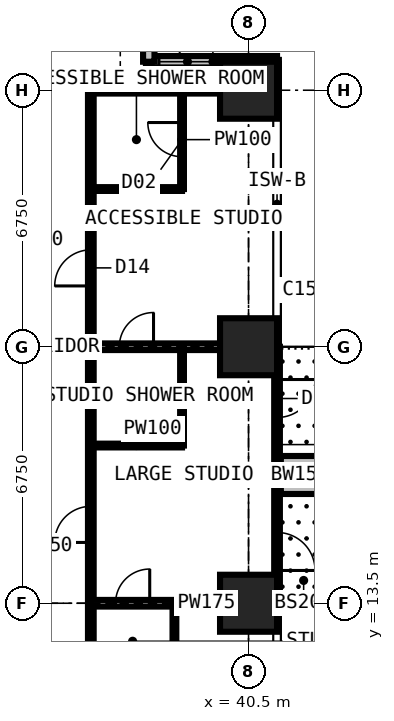
"""IFC4 building model, lengths in metres.
Left out: names, types, materials, properties, quantities, classifications, styles, units other than length and angle.
Written with IfcOpenShell. Run it as: python <this file> out.ifc"""

import sys

from ifc_helpers import new_model, si_unit, direction, frame, frame_2d, origin, origin_2d, place, context, subcontext, project, spatial, rectangle, extrude, element, fill, save


model = new_model("IFC4")
c1 = context("Model", 3, precision=1e-05, world=origin(), true_north=direction((0.0, 1.0)))
c2 = subcontext(c1, "Body", "Model", "MODEL_VIEW")
j1 = project(units=[si_unit("LENGTHUNIT", "METRE"), si_unit("PLANEANGLEUNIT", "RADIAN")], contexts=[c1])
p1 = place(None, origin())
s1 = spatial("IfcSite", under=j1, at=p1, CompositionType="ELEMENT")
p2 = place(p1, origin())
s2 = spatial("IfcBuilding", under=s1, at=p2, CompositionType="ELEMENT")
p3 = place(p2, frame((0.0, 0.0, 123.3)))
s3 = spatial("IfcBuildingStorey", under=s2, at=p3, CompositionType="ELEMENT", Elevation=123.3)
for number, where, z_axis, x_axis in (
    (1, (40.5, 13.5, 0.0), (0.0, 0.0, 1.0), (1.0, 0.0, 0.0)),
    (2, (40.5, 20.25, 0.0), (0.0, 0.0, 1.0), (1.0, 0.0, 0.0)),
    (3, (40.5, 27.0, 0.0), (0.0, 0.0, 1.0), (1.0, 0.0, 0.0)),
):
    element("IfcColumn", number, at=place(p3, frame(where, z_axis=z_axis, x_axis=x_axis)), inside=s3, PredefinedType="COLUMN", context=c2, shape_type="SweptSolid", body=[
        extrude(rectangle(XDim=1.5, YDim=1.5, at=origin_2d()), origin(), (0.0, 0.0, 1.0), 3.6),
    ])
p4 = place(p3, frame((41.25, 20.25, 0.0), z_axis=(0.0, 0.0, 1.0), x_axis=(0.0, -1.0, 0.0)))
e4 = element("IfcWall", 4, at=p4, inside=s3, PredefinedType="SOLIDWALL", context=c2, shape_type="SweptSolid", body=[
    extrude(rectangle(XDim=6.75, YDim=0.15, at=frame_2d((3.375, 0.0))), origin(), (0.0, 0.0, 1.0), 3.375),
])
p5 = place(p4, frame((0.863, 0.0, 0.0)))
e5 = element("IfcOpeningElement", 5, at=p5, cuts=e4, PredefinedType="OPENING", context=c2, shape_type="SweptSolid", body=[
    extrude(rectangle(XDim=1.0, YDim=2.2, at=frame_2d((0.5, 1.1))), frame((0.0, 0.085, 0.0), z_axis=(0.0, -1.0, 0.0), x_axis=(1.0, 0.0, 0.0)), (0.0, 0.0, 1.0), 0.17),
])
p6 = place(p4, frame((1.975, 0.0, 0.9)))
e6 = element("IfcOpeningElement", 6, at=p6, cuts=e4, PredefinedType="OPENING", context=c2, shape_type="SweptSolid", body=[
    extrude(rectangle(XDim=1.2, YDim=1.8, at=frame_2d((0.6, 0.9))), frame((0.0, 0.085, 0.0), z_axis=(0.0, -1.0, 0.0), x_axis=(1.0, 0.0, 0.0)), (0.0, 0.0, 1.0), 0.17),
])
p7 = place(p4, frame((4.887, 0.0, 0.0)))
e7 = element("IfcOpeningElement", 7, at=p7, cuts=e4, PredefinedType="OPENING", context=c2, shape_type="SweptSolid", body=[
    extrude(rectangle(XDim=1.0, YDim=2.2, at=frame_2d((0.5, 1.1))), frame((0.0, 0.085, 0.0), z_axis=(0.0, -1.0, 0.0), x_axis=(1.0, 0.0, 0.0)), (0.0, 0.0, 1.0), 0.17),
])
p8 = place(p4, frame((3.575, 0.0, 0.9)))
e8 = element("IfcOpeningElement", 8, at=p8, cuts=e4, PredefinedType="OPENING", context=c2, shape_type="SweptSolid", body=[
    extrude(rectangle(XDim=1.2, YDim=1.8, at=frame_2d((0.6, 0.9))), frame((0.0, 0.085, 0.0), z_axis=(0.0, -1.0, 0.0), x_axis=(1.0, 0.0, 0.0)), (0.0, 0.0, 1.0), 0.17),
])
p9 = place(p3, frame((41.25, 27.75, 0.0), z_axis=(0.0, 0.0, 1.0), x_axis=(-1.0, 0.0, 0.0)))
e9 = element("IfcWall", 9, at=p9, inside=s3, PredefinedType="SOLIDWALL", context=c2, shape_type="SweptSolid", body=[
    extrude(rectangle(XDim=3.375, YDim=0.3, at=frame_2d((1.688, 0.0))), origin(), (0.0, 0.0, 1.0), 3.375),
])
p10 = place(p9, frame((1.607, 0.0, 0.9)))
e10 = element("IfcOpeningElement", 10, at=p10, cuts=e9, PredefinedType="OPENING", context=c2, shape_type="SweptSolid", body=[
    extrude(rectangle(XDim=1.5, YDim=1.8, at=frame_2d((0.75, 0.9))), frame((0.0, 0.16, 0.0), z_axis=(0.0, -1.0, 0.0), x_axis=(1.0, 0.0, 0.0)), (0.0, 0.0, 1.0), 0.32),
])
p11 = place(p3, frame((37.875, 27.75, 0.0), z_axis=(0.0, 0.0, 1.0), x_axis=(0.0, 1.0, 0.0)))
e11 = element("IfcWall", 11, at=p11, inside=s3, PredefinedType="SOLIDWALL", context=c2, shape_type="SweptSolid", body=[
    extrude(rectangle(XDim=3.375, YDim=0.3, at=frame_2d((1.688, 0.0))), origin(), (0.0, 0.0, 1.0), 3.375),
])
p12 = place(p11, frame((0.788, 0.0, 0.6)))
e12 = element("IfcOpeningElement", 12, at=p12, cuts=e11, PredefinedType="OPENING", context=c2, shape_type="SweptSolid", body=[
    extrude(rectangle(XDim=1.8, YDim=2.1, at=frame_2d((0.9, 1.05))), frame((0.0, 0.16, 0.0), z_axis=(0.0, -1.0, 0.0), x_axis=(1.0, 0.0, 0.0)), (0.0, 0.0, 1.0), 0.32),
])
p13 = place(p3, frame((41.35, 16.875, 0.0), z_axis=(0.0, 0.0, 1.0), x_axis=(1.0, 0.0, 0.0)))
e13 = element("IfcWall", 13, at=p13, inside=s3, PredefinedType="USERDEFINED", context=c2, shape_type="SweptSolid", body=[
    extrude(rectangle(XDim=2.2, YDim=1.0, at=frame_2d((1.1, 0.0))), origin(), (0.0, 0.0, 1.0), 0.9),
])
p14 = place(p3, frame((36.35, 6.75, 0.0), z_axis=(0.0, 0.0, 1.0), x_axis=(0.0, 1.0, 0.0)))
e14 = element("IfcWall", 14, at=p14, inside=s3, PredefinedType="PARTITIONING", context=c2, shape_type="SweptSolid", body=[
    extrude(rectangle(XDim=20.25, YDim=0.15, at=frame_2d((10.125, 0.0))), origin(), (0.0, 0.0, 1.0), 3.375),
])
p15 = place(p14, frame((0.2, 0.0, 0.0)))
e15 = element("IfcOpeningElement", 15, at=p15, cuts=e14, PredefinedType="OPENING", context=c2, shape_type="SweptSolid", body=[
    extrude(rectangle(XDim=0.95, YDim=2.2, at=frame_2d((0.475, 1.1))), frame((0.0, 0.085, 0.0), z_axis=(0.0, -1.0, 0.0), x_axis=(1.0, 0.0, 0.0)), (0.0, 0.0, 1.0), 0.17),
])
p16 = place(p14, frame((15.1, 0.0, 0.0)))
e16 = element("IfcOpeningElement", 16, at=p16, cuts=e14, PredefinedType="OPENING", context=c2, shape_type="SweptSolid", body=[
    extrude(rectangle(XDim=0.95, YDim=2.2, at=frame_2d((0.475, 1.1))), frame((0.0, 0.085, 0.0), z_axis=(0.0, -1.0, 0.0), x_axis=(1.0, 0.0, 0.0)), (0.0, 0.0, 1.0), 0.17),
])
p17 = place(p14, frame((8.35, 0.0, 0.0)))
e17 = element("IfcOpeningElement", 17, at=p17, cuts=e14, PredefinedType="OPENING", context=c2, shape_type="SweptSolid", body=[
    extrude(rectangle(XDim=0.95, YDim=2.2, at=frame_2d((0.475, 1.1))), frame((0.0, 0.085, 0.0), z_axis=(0.0, -1.0, 0.0), x_axis=(1.0, 0.0, 0.0)), (0.0, 0.0, 1.0), 0.17),
])
p18 = place(p14, frame((3.575, 0.0, 0.0)))
e18 = element("IfcOpeningElement", 18, at=p18, cuts=e14, PredefinedType="OPENING", context=c2, shape_type="SweptSolid", body=[
    extrude(rectangle(XDim=0.95, YDim=2.2, at=frame_2d((0.475, 1.1))), frame((0.0, 0.085, 0.0), z_axis=(0.0, -1.0, 0.0), x_axis=(1.0, 0.0, 0.0)), (0.0, 0.0, 1.0), 0.17),
])
p19 = place(p3, frame((36.35, 13.5, 0.0), z_axis=(0.0, 0.0, 1.0), x_axis=(1.0, 0.0, 0.0)))
e19 = element("IfcWall", 19, at=p19, inside=s3, PredefinedType="PARTITIONING", context=c2, shape_type="SweptSolid", body=[
    extrude(rectangle(XDim=4.884, YDim=0.175, at=frame_2d((2.442, 0.0))), origin(), (0.0, 0.0, 1.0), 2.877),
])
p20 = place(p19, frame((0.65, 0.0, 0.0)))
e20 = element("IfcOpeningElement", 20, at=p20, cuts=e19, PredefinedType="OPENING", context=c2, shape_type="SweptSolid", body=[
    extrude(rectangle(XDim=0.9, YDim=2.2, at=frame_2d((0.45, 1.1))), frame((0.0, 0.097, 0.0), z_axis=(0.0, -1.0, 0.0), x_axis=(1.0, 0.0, 0.0)), (0.0, 0.0, 1.0), 0.195),
])
p21 = place(p3, frame((36.35, 17.65, 0.0), z_axis=(0.0, 0.0, 1.0), x_axis=(1.0, 0.0, 0.0)))
e21 = element("IfcWall", 21, at=p21, inside=s3, PredefinedType="PARTITIONING", context=c2, shape_type="SweptSolid", body=[
    extrude(rectangle(XDim=2.4, YDim=0.1, at=frame_2d((1.2, 0.0))), origin(), (0.0, 0.0, 1.0), 3.375),
])
p22 = place(p3, frame((36.35, 20.25, 0.0), z_axis=(0.0, 0.0, 1.0), x_axis=(1.0, 0.0, 0.0)))
e22 = element("IfcWall", 22, at=p22, inside=s3, PredefinedType="PARTITIONING", context=c2, shape_type="SweptSolid", body=[
    extrude(rectangle(XDim=4.884, YDim=0.175, at=frame_2d((2.442, 0.0))), origin(), (0.0, 0.0, 1.0), 2.877),
])
p23 = place(p22, frame((0.75, 0.0, 0.0)))
e23 = element("IfcOpeningElement", 23, at=p23, cuts=e22, PredefinedType="OPENING", context=c2, shape_type="SweptSolid", body=[
    extrude(rectangle(XDim=0.9, YDim=2.2, at=frame_2d((0.45, 1.1))), frame((0.0, 0.097, 0.0), z_axis=(0.0, -1.0, 0.0), x_axis=(1.0, 0.0, 0.0)), (0.0, 0.0, 1.0), 0.195),
])
p24 = place(p3, frame((36.35, 24.4, 0.0), z_axis=(0.0, 0.0, 1.0), x_axis=(1.0, 0.0, 0.0)))
e24 = element("IfcWall", 24, at=p24, inside=s3, PredefinedType="PARTITIONING", context=c2, shape_type="SweptSolid", body=[
    extrude(rectangle(XDim=2.4, YDim=0.1, at=frame_2d((1.2, 0.0))), origin(), (0.0, 0.0, 1.0), 3.375),
])
p25 = place(p3, frame((36.35, 27.0, 0.0), z_axis=(0.0, 0.0, 1.0), x_axis=(1.0, 0.0, 0.0)))
e25 = element("IfcWall", 25, at=p25, inside=s3, PredefinedType="PARTITIONING", context=c2, shape_type="SweptSolid", body=[
    extrude(rectangle(XDim=4.884, YDim=0.175, at=frame_2d((2.442, 0.0))), origin(), (0.0, 0.0, 1.0), 2.877),
])
p26 = place(p3, frame((37.875, 27.0, 0.0), z_axis=(0.0, 0.0, 1.0), x_axis=(0.0, 1.0, 0.0)))
e26 = element("IfcWall", 26, at=p26, inside=s3, PredefinedType="PARTITIONING", context=c2, shape_type="SweptSolid", body=[
    extrude(rectangle(XDim=0.734, YDim=0.15, at=frame_2d((0.367, 0.0))), origin(), (0.0, 0.0, 1.0), 3.375),
])
p27 = place(p3, frame((38.55, 11.5, 0.0), z_axis=(0.0, 0.0, 1.0), x_axis=(0.0, 1.0, 0.0)))
e27 = element("IfcWall", 27, at=p27, inside=s3, PredefinedType="PARTITIONING", context=c2, shape_type="SweptSolid", body=[
    extrude(rectangle(XDim=2.0, YDim=0.1, at=frame_2d((1.0, 0.0))), origin(), (0.0, 0.0, 1.0), 3.375),
])
p28 = place(p3, frame((38.75, 17.65, 0.0), z_axis=(0.0, 0.0, 1.0), x_axis=(0.0, 1.0, 0.0)))
e28 = element("IfcWall", 28, at=p28, inside=s3, PredefinedType="PARTITIONING", context=c2, shape_type="SweptSolid", body=[
    extrude(rectangle(XDim=2.6, YDim=0.1, at=frame_2d((1.3, 0.0))), origin(), (0.0, 0.0, 1.0), 3.375),
])
p29 = place(p3, frame((38.75, 24.4, 0.0), z_axis=(0.0, 0.0, 1.0), x_axis=(0.0, 1.0, 0.0)))
e29 = element("IfcWall", 29, at=p29, inside=s3, PredefinedType="PARTITIONING", context=c2, shape_type="SweptSolid", body=[
    extrude(rectangle(XDim=2.6, YDim=0.1, at=frame_2d((1.3, 0.0))), origin(), (0.0, 0.0, 1.0), 3.375),
])
p30 = place(p29, frame((0.85, 0.0, 0.0)))
e30 = element("IfcOpeningElement", 30, at=p30, cuts=e29, PredefinedType="OPENING", context=c2, shape_type="SweptSolid", body=[
    extrude(rectangle(XDim=0.9, YDim=2.2, at=frame_2d((0.45, 1.1))), frame((0.0, 0.06, 0.0), z_axis=(0.0, -1.0, 0.0), x_axis=(1.0, 0.0, 0.0)), (0.0, 0.0, 1.0), 0.12),
])
p31 = place(p5, origin())
e31 = element("IfcDoor", 31, at=p31, inside=s3, OperationType="SINGLE_SWING_LEFT", PredefinedType="DOOR", context=c2, shape_type="SweptSolid", body=[
    extrude(rectangle(XDim=1.0, YDim=2.2, at=frame_2d((0.5, 1.1))), frame((0.0, 0.025, 0.0), z_axis=(0.0, -1.0, 0.0), x_axis=(1.0, 0.0, 0.0)), (0.0, 0.0, 1.0), 0.05),
])
fill(e5, e31)
p32 = place(p6, origin())
e32 = element("IfcWindow", 32, at=p32, inside=s3, PartitioningType="SINGLE_PANEL", PredefinedType="WINDOW", context=c2, shape_type="SweptSolid", body=[
    extrude(rectangle(XDim=1.2, YDim=1.8, at=frame_2d((0.6, 0.9))), frame((0.0, 0.03, 0.0), z_axis=(0.0, -1.0, 0.0), x_axis=(1.0, 0.0, 0.0)), (0.0, 0.0, 1.0), 0.06),
])
fill(e6, e32)
p33 = place(p7, origin())
e33 = element("IfcDoor", 33, at=p33, inside=s3, OperationType="SINGLE_SWING_RIGHT", PredefinedType="DOOR", context=c2, shape_type="SweptSolid", body=[
    extrude(rectangle(XDim=1.0, YDim=2.2, at=frame_2d((0.5, 1.1))), frame((0.0, 0.025, 0.0), z_axis=(0.0, -1.0, 0.0), x_axis=(1.0, 0.0, 0.0)), (0.0, 0.0, 1.0), 0.05),
])
fill(e7, e33)
p34 = place(p8, origin())
e34 = element("IfcWindow", 34, at=p34, inside=s3, PartitioningType="SINGLE_PANEL", PredefinedType="WINDOW", context=c2, shape_type="SweptSolid", body=[
    extrude(rectangle(XDim=1.2, YDim=1.8, at=frame_2d((0.6, 0.9))), frame((0.0, 0.03, 0.0), z_axis=(0.0, -1.0, 0.0), x_axis=(1.0, 0.0, 0.0)), (0.0, 0.0, 1.0), 0.06),
])
fill(e8, e34)
p35 = place(p10, origin())
e35 = element("IfcWindow", 35, at=p35, inside=s3, PartitioningType="SINGLE_PANEL", PredefinedType="WINDOW", context=c2, shape_type="SweptSolid", body=[
    extrude(rectangle(XDim=1.5, YDim=1.8, at=frame_2d((0.75, 0.9))), frame((0.0, 0.03, 0.0), z_axis=(0.0, -1.0, 0.0), x_axis=(1.0, 0.0, 0.0)), (0.0, 0.0, 1.0), 0.06),
])
fill(e10, e35)
p36 = place(p16, origin())
e36 = element("IfcDoor", 36, at=p36, inside=s3, OperationType="SINGLE_SWING_LEFT", PredefinedType="DOOR", context=c2, shape_type="SweptSolid", body=[
    extrude(rectangle(XDim=0.95, YDim=2.2, at=frame_2d((0.475, 1.1))), frame((0.0, 0.025, 0.0), z_axis=(0.0, -1.0, 0.0), x_axis=(1.0, 0.0, 0.0)), (0.0, 0.0, 1.0), 0.05),
])
fill(e16, e36)
p37 = place(p30, origin())
e37 = element("IfcDoor", 37, at=p37, inside=s3, OperationType="SINGLE_SWING_RIGHT", PredefinedType="DOOR", context=c2, shape_type="SweptSolid", body=[
    extrude(rectangle(XDim=0.9, YDim=2.2, at=frame_2d((0.45, 1.1))), frame((0.0, 0.025, 0.0), z_axis=(0.0, -1.0, 0.0), x_axis=(1.0, 0.0, 0.0)), (0.0, 0.0, 1.0), 0.05),
])
fill(e30, e37)
p38 = place(p17, origin())
e38 = element("IfcDoor", 38, at=p38, inside=s3, OperationType="SINGLE_SWING_LEFT", PredefinedType="DOOR", context=c2, shape_type="SweptSolid", body=[
    extrude(rectangle(XDim=0.95, YDim=2.2, at=frame_2d((0.475, 1.1))), frame((0.0, 0.025, 0.0), z_axis=(0.0, -1.0, 0.0), x_axis=(1.0, 0.0, 0.0)), (0.0, 0.0, 1.0), 0.05),
])
fill(e17, e38)
p39 = place(p23, origin())
e39 = element("IfcDoor", 39, at=p39, inside=s3, OperationType="SINGLE_SWING_RIGHT", PredefinedType="DOOR", context=c2, shape_type="SweptSolid", body=[
    extrude(rectangle(XDim=0.9, YDim=2.2, at=frame_2d((0.45, 1.1))), frame((0.0, 0.025, 0.0), z_axis=(0.0, -1.0, 0.0), x_axis=(1.0, 0.0, 0.0)), (0.0, 0.0, 1.0), 0.05),
])
fill(e23, e39)
p40 = place(p20, origin())
e40 = element("IfcDoor", 40, at=p40, inside=s3, OperationType="SINGLE_SWING_RIGHT", PredefinedType="DOOR", context=c2, shape_type="SweptSolid", body=[
    extrude(rectangle(XDim=0.9, YDim=2.2, at=frame_2d((0.45, 1.1))), frame((0.0, 0.025, 0.0), z_axis=(0.0, -1.0, 0.0), x_axis=(1.0, 0.0, 0.0)), (0.0, 0.0, 1.0), 0.05),
])
fill(e20, e40)
save(model, sys.argv[1])
